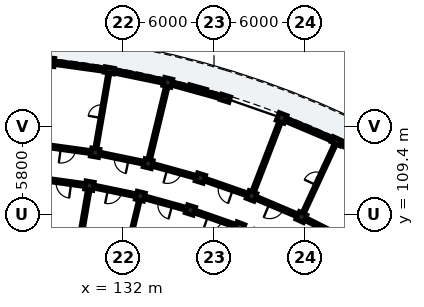
"""IFC4 building model, lengths in metres.
Left out: names, types, materials, properties, quantities, classifications, styles, units other than length and angle.
Written with IfcOpenShell. Run it as: python <this file> out.ifc"""

import sys

from ifc_helpers import new_model, si_unit, direction, frame, frame_2d, origin, origin_2d, place, context, subcontext, project, spatial, rectangle, extrude, element, fill, save


model = new_model("IFC4")
c1 = context("Model", 3, precision=1e-05, world=origin(), true_north=direction((0.0, 1.0)))
c2 = subcontext(c1, "Body", "Model", "MODEL_VIEW")
j1 = project(units=[si_unit("LENGTHUNIT", "METRE"), si_unit("PLANEANGLEUNIT", "RADIAN")], contexts=[c1])
p1 = place(None, origin())
s1 = spatial("IfcSite", under=j1, at=p1, CompositionType="ELEMENT")
p2 = place(p1, origin())
s2 = spatial("IfcBuilding", under=s1, at=p2, CompositionType="ELEMENT")
p3 = place(p2, frame((0.0, 0.0, 22.28)))
s3 = spatial("IfcBuildingStorey", under=s2, at=p3, CompositionType="ELEMENT", Elevation=22.28)
p4 = place(p3, frame((143.748, 109.23, 0.0), z_axis=(0.0, 0.0, 1.0), x_axis=(0.420859860775, 0.907125668024, 0.0)))
e1 = element("IfcColumn", 1, at=p4, inside=s3, PredefinedType="COLUMN", context=c2, shape_type="SweptSolid", body=[
    extrude(rectangle(XDim=0.55, YDim=0.55, at=origin_2d()), origin(), (0.0, 0.0, 1.0), 3.11),
])
p5 = place(p3, frame((146.062, 114.219, 0.0), z_axis=(0.0, 0.0, 1.0), x_axis=(0.420859860775, 0.907125668024, 0.0)))
e2 = element("IfcColumn", 2, at=p5, inside=s3, PredefinedType="PILASTER", context=c2, shape_type="SweptSolid", body=[
    extrude(rectangle(XDim=0.38, YDim=0.62, at=origin_2d()), origin(), (0.0, 0.0, 1.0), 3.11),
])
for number, where, z_axis, x_axis in (
    (3, (139.675, 108.57, 0.0), (0.0, 0.0, 1.0), (0.36, 0.933, 0.0)),
    (4, (140.468, 110.622, 0.0), (0.0, 0.0, 1.0), (0.36, 0.933, 0.0)),
    (5, (142.448, 115.753, 0.0), (0.0, 0.0, 1.0), (0.36, 0.933, 0.0)),
    (6, (136.448, 109.695, 0.0), (0.0, 0.0, 1.0), (0.298, 0.955, 0.0)),
    (7, (137.103, 111.795, 0.0), (0.0, 0.0, 1.0), (0.298, 0.955, 0.0)),
):
    element("IfcColumn", number, at=place(p3, frame(where, z_axis=z_axis, x_axis=x_axis)), inside=s3, PredefinedType="COLUMN", context=c2, shape_type="SweptSolid", body=[
        extrude(rectangle(XDim=0.55, YDim=0.55, at=origin_2d()), origin(), (0.0, 0.0, 1.0), 3.11),
    ])
p6 = place(p3, frame((138.742, 117.046, 0.0), z_axis=(0.0, 0.0, 1.0), x_axis=(0.297930225503, 0.954587649581, 0.0)))
e8 = element("IfcColumn", 8, at=p6, inside=s3, PredefinedType="PILASTER", context=c2, shape_type="SweptSolid", body=[
    extrude(rectangle(XDim=0.38, YDim=0.62, at=origin_2d()), origin(), (0.0, 0.0, 1.0), 3.11),
])
for number, where, z_axis, x_axis in (
    (9, (133.153, 110.606, 0.0), (0.0, 0.0, 1.0), (0.234, 0.972, 0.0)),
    (10, (133.669, 112.744, 0.0), (0.0, 0.0, 1.0), (0.234, 0.972, 0.0)),
    (11, (134.958, 118.091, 0.0), (0.0, 0.0, 1.0), (0.234, 0.972, 0.0)),
    (12, (129.806, 111.297, 0.0), (0.0, 0.0, 1.0), (0.17, 0.985, 0.0)),
    (13, (130.179, 113.465, 0.0), (0.0, 0.0, 1.0), (0.17, 0.985, 0.0)),
):
    element("IfcColumn", number, at=place(p3, frame(where, z_axis=z_axis, x_axis=x_axis)), inside=s3, PredefinedType="COLUMN", context=c2, shape_type="SweptSolid", body=[
        extrude(rectangle(XDim=0.55, YDim=0.55, at=origin_2d()), origin(), (0.0, 0.0, 1.0), 3.11),
    ])
p7 = place(p3, frame((131.113, 118.885, 0.0), z_axis=(0.0, 0.0, 1.0), x_axis=(0.169827230012, 0.985473851478, 0.0)))
e14 = element("IfcColumn", 14, at=p7, inside=s3, PredefinedType="PILASTER", context=c2, shape_type="SweptSolid", body=[
    extrude(rectangle(XDim=0.38, YDim=0.62, at=origin_2d()), origin(), (0.0, 0.0, 1.0), 3.11),
])
p8 = place(p3, frame((127.225, 119.424, 0.0), z_axis=(0.0, 0.0, 1.0), x_axis=(0.104528393837, 0.994521902666, 0.0)))
e15 = element("IfcColumn", 15, at=p8, inside=s3, PredefinedType="COLUMN", context=c2, shape_type="SweptSolid", body=[
    extrude(rectangle(XDim=0.55, YDim=0.55, at=origin_2d()), origin(), (0.0, 0.0, 1.0), 3.11),
])
p9 = place(p3, frame((149.348, 112.561, 0.0), z_axis=(0.0, 0.0, 1.0), x_axis=(-0.892756700232, 0.450539092855, 0.0)))
e16 = element("IfcWall", 16, at=p9, inside=s3, PredefinedType="SOLIDWALL", context=c2, shape_type="SweptSolid", body=[
    extrude(rectangle(XDim=3.521, YDim=0.24, at=frame_2d((1.76, 0.0))), origin(), (0.0, 0.0, 1.0), 2.355),
])
p10 = place(p9, frame((0.91, 0.0, 0.35)))
e17 = element("IfcOpeningElement", 17, at=p10, cuts=e16, PredefinedType="OPENING", context=c2, shape_type="SweptSolid", body=[
    extrude(rectangle(XDim=1.7, YDim=1.8, at=frame_2d((0.85, 0.9))), frame((0.0, 0.13, 0.0), z_axis=(0.0, -1.0, 0.0), x_axis=(1.0, 0.0, 0.0)), (0.0, 0.0, 1.0), 0.26),
])
p11 = place(p3, frame((145.915, 114.282, 0.0), z_axis=(0.0, 0.0, 1.0), x_axis=(-0.920502438884, 0.390736816807, 0.0)))
e18 = element("IfcWall", 18, at=p11, inside=s3, PredefinedType="SOLIDWALL", context=c2, shape_type="SweptSolid", body=[
    extrude(rectangle(XDim=3.521, YDim=0.24, at=frame_2d((1.76, 0.0))), origin(), (0.0, 0.0, 1.0), 2.355),
])
p12 = place(p11, frame((1.22, 0.0, 0.55)))
e19 = element("IfcOpeningElement", 19, at=p12, cuts=e18, PredefinedType="OPENING", context=c2, shape_type="SweptSolid", body=[
    extrude(rectangle(XDim=1.08, YDim=1.45, at=frame_2d((0.54, 0.725))), frame((0.0, 0.13, 0.0), z_axis=(0.0, -1.0, 0.0), x_axis=(1.0, 0.0, 0.0)), (0.0, 0.0, 1.0), 0.26),
])
p13 = place(p3, frame((138.587, 117.088, 0.0), z_axis=(0.0, 0.0, 1.0), x_axis=(-0.963894473631, 0.266284516456, 0.0)))
e20 = element("IfcWall", 20, at=p13, inside=s3, PredefinedType="SOLIDWALL", context=c2, shape_type="SweptSolid", body=[
    extrude(rectangle(XDim=3.521, YDim=0.24, at=frame_2d((1.76, 0.0))), origin(), (0.0, 0.0, 1.0), 2.355),
])
p14 = place(p13, frame((1.18, 0.0, 0.55)))
e21 = element("IfcOpeningElement", 21, at=p14, cuts=e20, PredefinedType="OPENING", context=c2, shape_type="SweptSolid", body=[
    extrude(rectangle(XDim=1.16, YDim=1.485, at=frame_2d((0.58, 0.743))), frame((0.0, 0.13, 0.0), z_axis=(0.0, -1.0, 0.0), x_axis=(1.0, 0.0, 0.0)), (0.0, 0.0, 1.0), 0.26),
])
p15 = place(p3, frame((134.718, 118.141, 0.0), z_axis=(0.0, 0.0, 1.0), x_axis=(-0.979340051053, 0.202220336275, 0.0)))
e22 = element("IfcWall", 22, at=p15, inside=s3, PredefinedType="SOLIDWALL", context=c2, shape_type="SweptSolid", body=[
    extrude(rectangle(XDim=3.521, YDim=0.24, at=frame_2d((1.76, 0.0))), origin(), (0.0, 0.0, 1.0), 2.355),
])
p16 = place(p15, frame((1.12, 0.0, 0.55)))
e23 = element("IfcOpeningElement", 23, at=p16, cuts=e22, PredefinedType="OPENING", context=c2, shape_type="SweptSolid", body=[
    extrude(rectangle(XDim=1.28, YDim=1.56, at=frame_2d((0.64, 0.78))), frame((0.0, 0.13, 0.0), z_axis=(0.0, -1.0, 0.0), x_axis=(1.0, 0.0, 0.0)), (0.0, 0.0, 1.0), 0.26),
])
p17 = place(p3, frame((130.955, 118.907, 0.0), z_axis=(0.0, 0.0, 1.0), x_axis=(-0.990539718913, 0.137226328578, 0.0)))
e24 = element("IfcWall", 24, at=p17, inside=s3, PredefinedType="SOLIDWALL", context=c2, shape_type="SweptSolid", body=[
    extrude(rectangle(XDim=3.521, YDim=0.24, at=frame_2d((1.76, 0.0))), origin(), (0.0, 0.0, 1.0), 2.355),
])
p18 = place(p17, frame((1.06, 0.0, 0.55)))
e25 = element("IfcOpeningElement", 25, at=p18, cuts=e24, PredefinedType="OPENING", context=c2, shape_type="SweptSolid", body=[
    extrude(rectangle(XDim=1.4, YDim=1.635, at=frame_2d((0.7, 0.817))), frame((0.0, 0.13, 0.0), z_axis=(0.0, -1.0, 0.0), x_axis=(1.0, 0.0, 0.0)), (0.0, 0.0, 1.0), 0.26),
])
p19 = place(p3, frame((146.616, 107.782, 0.0), z_axis=(0.0, 0.0, 1.0), x_axis=(-0.89273239336, 0.450587254419, 0.0)))
e26 = element("IfcWall", 26, at=p19, inside=s3, PredefinedType="PARTITIONING", context=c2, shape_type="SweptSolid", body=[
    extrude(rectangle(XDim=2.863, YDim=0.205, at=frame_2d((1.432, 0.0))), origin(), (0.0, 0.0, 1.0), 2.37),
])
p20 = place(p19, frame((0.967, 0.0, 0.0)))
e27 = element("IfcOpeningElement", 27, at=p20, cuts=e26, PredefinedType="OPENING", context=c2, shape_type="SweptSolid", body=[
    extrude(rectangle(XDim=0.93, YDim=2.12, at=frame_2d((0.465, 1.06))), frame((0.0, 0.113, 0.0), z_axis=(0.0, -1.0, 0.0), x_axis=(1.0, 0.0, 0.0)), (0.0, 0.0, 1.0), 0.225),
])
p21 = place(p3, frame((143.916, 109.593, 0.0), z_axis=(0.0, 0.0, 1.0), x_axis=(0.420862519045, 0.907124434718, 0.0)))
e28 = element("IfcWall", 28, at=p21, inside=s3, PredefinedType="PLUMBINGWALL", context=c2, shape_type="SweptSolid", body=[
    extrude(rectangle(XDim=4.7, YDim=0.15, at=frame_2d((2.35, 0.0))), origin(), (0.0, 0.0, 1.0), 2.37),
])
p22 = place(p21, frame((1.92, 0.0, 0.0)))
e29 = element("IfcOpeningElement", 29, at=p22, cuts=e28, PredefinedType="OPENING", context=c2, shape_type="SweptSolid", body=[
    extrude(rectangle(XDim=0.86, YDim=2.06, at=frame_2d((0.43, 1.03))), frame((0.0, 0.085, 0.0), z_axis=(0.0, -1.0, 0.0), x_axis=(1.0, 0.0, 0.0)), (0.0, 0.0, 1.0), 0.17),
])
p23 = place(p3, frame((143.425, 109.367, 0.0), z_axis=(0.0, 0.0, 1.0), x_axis=(-0.920511160294, 0.390716270168, 0.0)))
e30 = element("IfcWall", 30, at=p23, inside=s3, PredefinedType="PARTITIONING", context=c2, shape_type="SweptSolid", body=[
    extrude(rectangle(XDim=2.863, YDim=0.205, at=frame_2d((1.432, 0.0))), origin(), (0.0, 0.0, 1.0), 2.37),
])
p24 = place(p23, frame((0.937, 0.0, 0.0)))
e31 = element("IfcOpeningElement", 31, at=p24, cuts=e30, PredefinedType="OPENING", context=c2, shape_type="SweptSolid", body=[
    extrude(rectangle(XDim=0.99, YDim=2.16, at=frame_2d((0.495, 1.08))), frame((0.0, 0.113, 0.0), z_axis=(0.0, -1.0, 0.0), x_axis=(1.0, 0.0, 0.0)), (0.0, 0.0, 1.0), 0.225),
])
p25 = place(p3, frame((140.612, 110.996, 0.0), z_axis=(0.0, 0.0, 1.0), x_axis=(0.360186633854, 0.932880264982, 0.0)))
e32 = element("IfcWall", 32, at=p25, inside=s3, PredefinedType="PARTITIONING", context=c2, shape_type="SweptSolid", body=[
    extrude(rectangle(XDim=4.7, YDim=0.185, at=frame_2d((2.35, 0.0))), origin(), (0.0, 0.0, 1.0), 2.37),
])
p26 = place(p3, frame((140.137, 110.738, 0.0), z_axis=(0.0, 0.0, 1.0), x_axis=(-0.944253820929, 0.329218349522, 0.0)))
e33 = element("IfcWall", 33, at=p26, inside=s3, PredefinedType="PARTITIONING", context=c2, shape_type="SweptSolid", body=[
    extrude(rectangle(XDim=2.863, YDim=0.205, at=frame_2d((1.432, 0.0))), origin(), (0.0, 0.0, 1.0), 2.37),
])
p27 = place(p26, frame((0.947, 0.0, 0.0)))
e34 = element("IfcOpeningElement", 34, at=p27, cuts=e33, PredefinedType="OPENING", context=c2, shape_type="SweptSolid", body=[
    extrude(rectangle(XDim=0.97, YDim=2.15, at=frame_2d((0.485, 1.075))), frame((0.0, 0.113, 0.0), z_axis=(0.0, -1.0, 0.0), x_axis=(1.0, 0.0, 0.0)), (0.0, 0.0, 1.0), 0.225),
])
p28 = place(p3, frame((139.345, 108.685, 0.0), z_axis=(0.0, 0.0, 1.0), x_axis=(-0.944265123647, 0.329185929627, 0.0)))
e35 = element("IfcWall", 35, at=p28, inside=s3, PredefinedType="PARTITIONING", context=c2, shape_type="SweptSolid", body=[
    extrude(rectangle(XDim=2.718, YDim=0.205, at=frame_2d((1.359, 0.0))), origin(), (0.0, 0.0, 1.0), 2.37),
])
p29 = place(p28, frame((0.874, 0.0, 0.0)))
e36 = element("IfcOpeningElement", 36, at=p29, cuts=e35, PredefinedType="OPENING", context=c2, shape_type="SweptSolid", body=[
    extrude(rectangle(XDim=0.97, YDim=2.15, at=frame_2d((0.485, 1.075))), frame((0.0, 0.113, 0.0), z_axis=(0.0, -1.0, 0.0), x_axis=(1.0, 0.0, 0.0)), (0.0, 0.0, 1.0), 0.225),
])
p30 = place(p3, frame((136.766, 111.889, 0.0), z_axis=(0.0, 0.0, 1.0), x_axis=(-0.963890789093, 0.266297853356, 0.0)))
e37 = element("IfcWall", 37, at=p30, inside=s3, PredefinedType="PARTITIONING", context=c2, shape_type="SweptSolid", body=[
    extrude(rectangle(XDim=2.863, YDim=0.205, at=frame_2d((1.432, 0.0))), origin(), (0.0, 0.0, 1.0), 2.37),
])
p31 = place(p30, frame((0.957, 0.0, 0.0)))
e38 = element("IfcOpeningElement", 38, at=p31, cuts=e37, PredefinedType="OPENING", context=c2, shape_type="SweptSolid", body=[
    extrude(rectangle(XDim=0.95, YDim=2.13, at=frame_2d((0.475, 1.065))), frame((0.0, 0.113, 0.0), z_axis=(0.0, -1.0, 0.0), x_axis=(1.0, 0.0, 0.0)), (0.0, 0.0, 1.0), 0.225),
])
p32 = place(p3, frame((136.11, 109.789, 0.0), z_axis=(0.0, 0.0, 1.0), x_axis=(-0.96388375821, 0.266323301006, 0.0)))
e39 = element("IfcWall", 39, at=p32, inside=s3, PredefinedType="PARTITIONING", context=c2, shape_type="SweptSolid", body=[
    extrude(rectangle(XDim=2.718, YDim=0.205, at=frame_2d((1.359, 0.0))), origin(), (0.0, 0.0, 1.0), 2.37),
])
p33 = place(p32, frame((0.884, 0.0, 0.0)))
e40 = element("IfcOpeningElement", 40, at=p33, cuts=e39, PredefinedType="OPENING", context=c2, shape_type="SweptSolid", body=[
    extrude(rectangle(XDim=0.95, YDim=2.13, at=frame_2d((0.475, 1.065))), frame((0.0, 0.113, 0.0), z_axis=(0.0, -1.0, 0.0), x_axis=(1.0, 0.0, 0.0)), (0.0, 0.0, 1.0), 0.225),
])
p34 = place(p3, frame((133.762, 113.133, 0.0), z_axis=(0.0, 0.0, 1.0), x_axis=(0.234386624934, 0.972143461662, 0.0)))
e41 = element("IfcWall", 41, at=p34, inside=s3, PredefinedType="PARTITIONING", context=c2, shape_type="SweptSolid", body=[
    extrude(rectangle(XDim=4.7, YDim=0.185, at=frame_2d((2.35, 0.0))), origin(), (0.0, 0.0, 1.0), 2.37),
])
p35 = place(p3, frame((131.512, 103.801, 0.0), z_axis=(0.0, 0.0, 1.0), x_axis=(0.234406698576, 0.972138621629, 0.0)))
e42 = element("IfcWall", 42, at=p35, inside=s3, PredefinedType="PARTITIONING", context=c2, shape_type="SweptSolid", body=[
    extrude(rectangle(XDim=6.6, YDim=0.125, at=frame_2d((3.3, 0.0))), origin(), (0.0, 0.0, 1.0), 2.37),
])
p36 = place(p35, frame((2.855, 0.0, 0.0)))
e43 = element("IfcOpeningElement", 43, at=p36, cuts=e42, PredefinedType="OPENING", context=c2, shape_type="SweptSolid", body=[
    extrude(rectangle(XDim=0.89, YDim=2.1, at=frame_2d((0.445, 1.05))), frame((0.0, 0.073, 0.0), z_axis=(0.0, -1.0, 0.0), x_axis=(1.0, 0.0, 0.0)), (0.0, 0.0, 1.0), 0.145),
])
p37 = place(p3, frame((133.326, 112.815, 0.0), z_axis=(0.0, 0.0, 1.0), x_axis=(-0.979348418612, 0.202179808492, 0.0)))
e44 = element("IfcWall", 44, at=p37, inside=s3, PredefinedType="PARTITIONING", context=c2, shape_type="SweptSolid", body=[
    extrude(rectangle(XDim=2.863, YDim=0.205, at=frame_2d((1.432, 0.0))), origin(), (0.0, 0.0, 1.0), 2.37),
])
p38 = place(p37, frame((0.967, 0.0, 0.0)))
e45 = element("IfcOpeningElement", 45, at=p38, cuts=e44, PredefinedType="OPENING", context=c2, shape_type="SweptSolid", body=[
    extrude(rectangle(XDim=0.93, YDim=2.12, at=frame_2d((0.465, 1.06))), frame((0.0, 0.113, 0.0), z_axis=(0.0, -1.0, 0.0), x_axis=(1.0, 0.0, 0.0)), (0.0, 0.0, 1.0), 0.225),
])
p39 = place(p3, frame((132.81, 110.677, 0.0), z_axis=(0.0, 0.0, 1.0), x_axis=(-0.979349423541, 0.202174940608, 0.0)))
e46 = element("IfcWall", 46, at=p39, inside=s3, PredefinedType="PARTITIONING", context=c2, shape_type="SweptSolid", body=[
    extrude(rectangle(XDim=2.718, YDim=0.205, at=frame_2d((1.359, 0.0))), origin(), (0.0, 0.0, 1.0), 2.37),
])
p40 = place(p39, frame((0.894, 0.0, 0.0)))
e47 = element("IfcOpeningElement", 47, at=p40, cuts=e46, PredefinedType="OPENING", context=c2, shape_type="SweptSolid", body=[
    extrude(rectangle(XDim=0.93, YDim=2.12, at=frame_2d((0.465, 1.06))), frame((0.0, 0.113, 0.0), z_axis=(0.0, -1.0, 0.0), x_axis=(1.0, 0.0, 0.0)), (0.0, 0.0, 1.0), 0.225),
])
p41 = place(p3, frame((130.247, 113.859, 0.0), z_axis=(0.0, 0.0, 1.0), x_axis=(0.169812980219, 0.985476307046, 0.0)))
e48 = element("IfcWall", 48, at=p41, inside=s3, PredefinedType="PLUMBINGWALL", context=c2, shape_type="SweptSolid", body=[
    extrude(rectangle(XDim=4.7, YDim=0.15, at=frame_2d((2.35, 0.0))), origin(), (0.0, 0.0, 1.0), 2.37),
])
p42 = place(p41, frame((1.92, 0.0, 0.0)))
e49 = element("IfcOpeningElement", 49, at=p42, cuts=e48, PredefinedType="OPENING", context=c2, shape_type="SweptSolid", body=[
    extrude(rectangle(XDim=0.86, YDim=2.06, at=frame_2d((0.43, 1.03))), frame((0.0, 0.085, 0.0), z_axis=(0.0, -1.0, 0.0), x_axis=(1.0, 0.0, 0.0)), (0.0, 0.0, 1.0), 0.17),
])
p43 = place(p3, frame((128.617, 104.398, 0.0), z_axis=(0.0, 0.0, 1.0), x_axis=(0.169825160084, 0.985474208187, 0.0)))
e50 = element("IfcWall", 50, at=p43, inside=s3, PredefinedType="PARTITIONING", context=c2, shape_type="SweptSolid", body=[
    extrude(rectangle(XDim=6.6, YDim=0.185, at=frame_2d((3.3, 0.0))), origin(), (0.0, 0.0, 1.0), 2.37),
])
p44 = place(p3, frame((129.833, 113.513, 0.0), z_axis=(0.0, 0.0, 1.0), x_axis=(-0.990544162976, 0.137194246211, 0.0)))
e51 = element("IfcWall", 51, at=p44, inside=s3, PredefinedType="PARTITIONING", context=c2, shape_type="SweptSolid", body=[
    extrude(rectangle(XDim=2.863, YDim=0.205, at=frame_2d((1.432, 0.0))), origin(), (0.0, 0.0, 1.0), 2.37),
])
p45 = place(p44, frame((0.937, 0.0, 0.0)))
e52 = element("IfcOpeningElement", 52, at=p45, cuts=e51, PredefinedType="OPENING", context=c2, shape_type="SweptSolid", body=[
    extrude(rectangle(XDim=0.99, YDim=2.16, at=frame_2d((0.495, 1.08))), frame((0.0, 0.113, 0.0), z_axis=(0.0, -1.0, 0.0), x_axis=(1.0, 0.0, 0.0)), (0.0, 0.0, 1.0), 0.225),
])
p46 = place(p3, frame((129.459, 111.345, 0.0), z_axis=(0.0, 0.0, 1.0), x_axis=(-0.990535404475, 0.137257467855, 0.0)))
e53 = element("IfcWall", 53, at=p46, inside=s3, PredefinedType="PARTITIONING", context=c2, shape_type="SweptSolid", body=[
    extrude(rectangle(XDim=2.718, YDim=0.205, at=frame_2d((1.359, 0.0))), origin(), (0.0, 0.0, 1.0), 2.37),
])
p47 = place(p46, frame((0.864, 0.0, 0.0)))
e54 = element("IfcOpeningElement", 54, at=p47, cuts=e53, PredefinedType="OPENING", context=c2, shape_type="SweptSolid", body=[
    extrude(rectangle(XDim=0.99, YDim=2.16, at=frame_2d((0.495, 1.08))), frame((0.0, 0.113, 0.0), z_axis=(0.0, -1.0, 0.0), x_axis=(1.0, 0.0, 0.0)), (0.0, 0.0, 1.0), 0.225),
])
p48 = place(p12, origin())
e55 = element("IfcWindow", 55, at=p48, inside=s3, PartitioningType="SINGLE_PANEL", PredefinedType="WINDOW", context=c2, shape_type="SweptSolid", body=[
    extrude(rectangle(XDim=1.08, YDim=1.45, at=frame_2d((0.54, 0.725))), frame((0.0, 0.03, 0.0), z_axis=(0.0, -1.0, 0.0), x_axis=(1.0, 0.0, 0.0)), (0.0, 0.0, 1.0), 0.06),
])
fill(e19, e55)
p49 = place(p14, origin())
e56 = element("IfcWindow", 56, at=p49, inside=s3, PartitioningType="SINGLE_PANEL", PredefinedType="WINDOW", context=c2, shape_type="SweptSolid", body=[
    extrude(rectangle(XDim=1.16, YDim=1.485, at=frame_2d((0.58, 0.743))), frame((0.0, 0.03, 0.0), z_axis=(0.0, -1.0, 0.0), x_axis=(1.0, 0.0, 0.0)), (0.0, 0.0, 1.0), 0.06),
])
fill(e21, e56)
p50 = place(p16, origin())
e57 = element("IfcWindow", 57, at=p50, inside=s3, PartitioningType="SINGLE_PANEL", PredefinedType="WINDOW", context=c2, shape_type="SweptSolid", body=[
    extrude(rectangle(XDim=1.28, YDim=1.56, at=frame_2d((0.64, 0.78))), frame((0.0, 0.03, 0.0), z_axis=(0.0, -1.0, 0.0), x_axis=(1.0, 0.0, 0.0)), (0.0, 0.0, 1.0), 0.06),
])
fill(e23, e57)
p51 = place(p18, origin())
e58 = element("IfcWindow", 58, at=p51, inside=s3, PartitioningType="SINGLE_PANEL", PredefinedType="WINDOW", context=c2, shape_type="SweptSolid", body=[
    extrude(rectangle(XDim=1.4, YDim=1.635, at=frame_2d((0.7, 0.817))), frame((0.0, 0.03, 0.0), z_axis=(0.0, -1.0, 0.0), x_axis=(1.0, 0.0, 0.0)), (0.0, 0.0, 1.0), 0.06),
])
fill(e25, e58)
p52 = place(p20, origin())
e59 = element("IfcDoor", 59, at=p52, inside=s3, OperationType="SINGLE_SWING_LEFT", PredefinedType="DOOR", context=c2, shape_type="SweptSolid", body=[
    extrude(rectangle(XDim=0.93, YDim=2.12, at=frame_2d((0.465, 1.06))), frame((0.0, 0.025, 0.0), z_axis=(0.0, -1.0, 0.0), x_axis=(1.0, 0.0, 0.0)), (0.0, 0.0, 1.0), 0.05),
])
fill(e27, e59)
p53 = place(p22, origin())
e60 = element("IfcDoor", 60, at=p53, inside=s3, OperationType="SINGLE_SWING_LEFT", PredefinedType="DOOR", context=c2, shape_type="SweptSolid", body=[
    extrude(rectangle(XDim=0.86, YDim=2.06, at=frame_2d((0.43, 1.03))), frame((0.0, 0.025, 0.0), z_axis=(0.0, -1.0, 0.0), x_axis=(1.0, 0.0, 0.0)), (0.0, 0.0, 1.0), 0.05),
])
fill(e29, e60)
p54 = place(p24, origin())
e61 = element("IfcDoor", 61, at=p54, inside=s3, OperationType="SINGLE_SWING_RIGHT", PredefinedType="DOOR", context=c2, shape_type="SweptSolid", body=[
    extrude(rectangle(XDim=0.99, YDim=2.16, at=frame_2d((0.495, 1.08))), frame((0.0, 0.025, 0.0), z_axis=(0.0, -1.0, 0.0), x_axis=(1.0, 0.0, 0.0)), (0.0, 0.0, 1.0), 0.05),
])
fill(e31, e61)
p55 = place(p27, origin())
e62 = element("IfcDoor", 62, at=p55, inside=s3, OperationType="SINGLE_SWING_LEFT", PredefinedType="DOOR", context=c2, shape_type="SweptSolid", body=[
    extrude(rectangle(XDim=0.97, YDim=2.15, at=frame_2d((0.485, 1.075))), frame((0.0, 0.025, 0.0), z_axis=(0.0, -1.0, 0.0), x_axis=(1.0, 0.0, 0.0)), (0.0, 0.0, 1.0), 0.05),
])
fill(e34, e62)
p56 = place(p29, origin())
e63 = element("IfcDoor", 63, at=p56, inside=s3, OperationType="SINGLE_SWING_RIGHT", PredefinedType="DOOR", context=c2, shape_type="SweptSolid", body=[
    extrude(rectangle(XDim=0.97, YDim=2.15, at=frame_2d((0.485, 1.075))), frame((0.0, 0.025, 0.0), z_axis=(0.0, -1.0, 0.0), x_axis=(1.0, 0.0, 0.0)), (0.0, 0.0, 1.0), 0.05),
])
fill(e36, e63)
p57 = place(p31, origin())
e64 = element("IfcDoor", 64, at=p57, inside=s3, OperationType="SINGLE_SWING_RIGHT", PredefinedType="DOOR", context=c2, shape_type="SweptSolid", body=[
    extrude(rectangle(XDim=0.95, YDim=2.13, at=frame_2d((0.475, 1.065))), frame((0.0, 0.025, 0.0), z_axis=(0.0, -1.0, 0.0), x_axis=(1.0, 0.0, 0.0)), (0.0, 0.0, 1.0), 0.05),
])
fill(e38, e64)
p58 = place(p33, origin())
e65 = element("IfcDoor", 65, at=p58, inside=s3, OperationType="SINGLE_SWING_LEFT", PredefinedType="DOOR", context=c2, shape_type="SweptSolid", body=[
    extrude(rectangle(XDim=0.95, YDim=2.13, at=frame_2d((0.475, 1.065))), frame((0.0, 0.025, 0.0), z_axis=(0.0, -1.0, 0.0), x_axis=(1.0, 0.0, 0.0)), (0.0, 0.0, 1.0), 0.05),
])
fill(e40, e65)
p59 = place(p38, origin())
e66 = element("IfcDoor", 66, at=p59, inside=s3, OperationType="SINGLE_SWING_LEFT", PredefinedType="DOOR", context=c2, shape_type="SweptSolid", body=[
    extrude(rectangle(XDim=0.93, YDim=2.12, at=frame_2d((0.465, 1.06))), frame((0.0, 0.025, 0.0), z_axis=(0.0, -1.0, 0.0), x_axis=(1.0, 0.0, 0.0)), (0.0, 0.0, 1.0), 0.05),
])
fill(e45, e66)
p60 = place(p40, origin())
e67 = element("IfcDoor", 67, at=p60, inside=s3, OperationType="SINGLE_SWING_RIGHT", PredefinedType="DOOR", context=c2, shape_type="SweptSolid", body=[
    extrude(rectangle(XDim=0.93, YDim=2.12, at=frame_2d((0.465, 1.06))), frame((0.0, 0.025, 0.0), z_axis=(0.0, -1.0, 0.0), x_axis=(1.0, 0.0, 0.0)), (0.0, 0.0, 1.0), 0.05),
])
fill(e47, e67)
p61 = place(p42, origin())
e68 = element("IfcDoor", 68, at=p61, inside=s3, OperationType="SINGLE_SWING_LEFT", PredefinedType="DOOR", context=c2, shape_type="SweptSolid", body=[
    extrude(rectangle(XDim=0.86, YDim=2.06, at=frame_2d((0.43, 1.03))), frame((0.0, 0.025, 0.0), z_axis=(0.0, -1.0, 0.0), x_axis=(1.0, 0.0, 0.0)), (0.0, 0.0, 1.0), 0.05),
])
fill(e49, e68)
p62 = place(p45, origin())
e69 = element("IfcDoor", 69, at=p62, inside=s3, OperationType="SINGLE_SWING_RIGHT", PredefinedType="DOOR", context=c2, shape_type="SweptSolid", body=[
    extrude(rectangle(XDim=0.99, YDim=2.16, at=frame_2d((0.495, 1.08))), frame((0.0, 0.025, 0.0), z_axis=(0.0, -1.0, 0.0), x_axis=(1.0, 0.0, 0.0)), (0.0, 0.0, 1.0), 0.05),
])
fill(e52, e69)
p63 = place(p47, origin())
e70 = element("IfcDoor", 70, at=p63, inside=s3, OperationType="SINGLE_SWING_LEFT", PredefinedType="DOOR", context=c2, shape_type="SweptSolid", body=[
    extrude(rectangle(XDim=0.99, YDim=2.16, at=frame_2d((0.495, 1.08))), frame((0.0, 0.025, 0.0), z_axis=(0.0, -1.0, 0.0), x_axis=(1.0, 0.0, 0.0)), (0.0, 0.0, 1.0), 0.05),
])
fill(e54, e70)
save(model, sys.argv[1])
